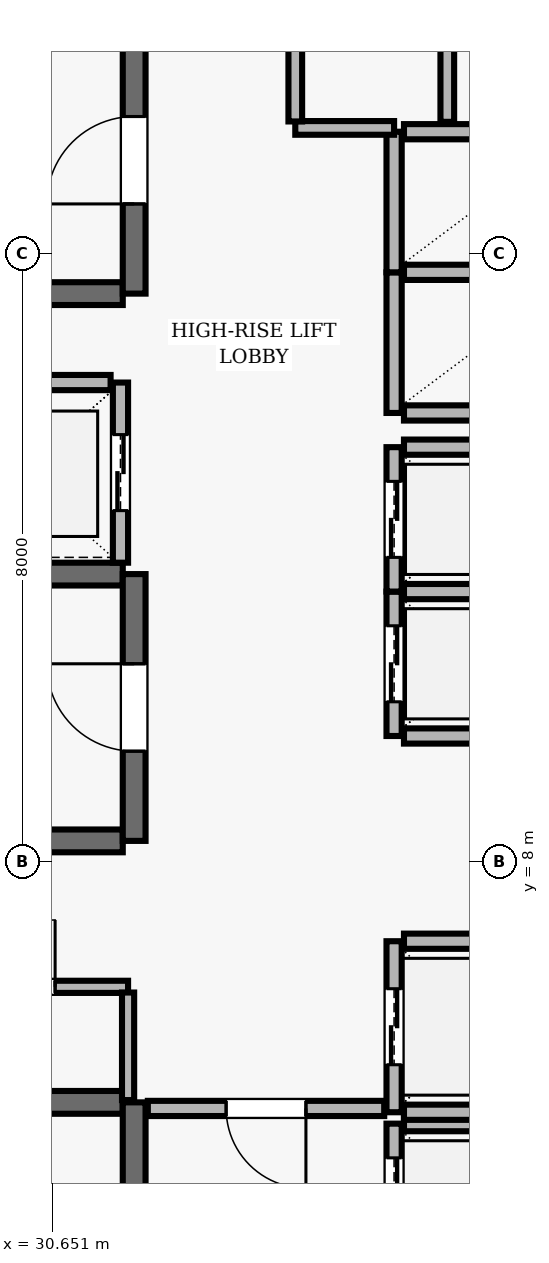
"""IFC4 building model, lengths in metres.
Left out: names, types, materials, properties, quantities, classifications, styles, units other than length and angle.
Written with IfcOpenShell. Run it as: python <this file> out.ifc"""

import sys

from ifc_helpers import new_model, si_unit, direction, frame, frame_2d, origin, place, context, subcontext, project, spatial, rectangle, extrude, element, fill, save


model = new_model("IFC4")
c1 = context("Model", 3, precision=1e-05, world=origin(), true_north=direction((0.0, 1.0)))
c2 = subcontext(c1, "Body", "Model", "MODEL_VIEW")
j1 = project(units=[si_unit("LENGTHUNIT", "METRE"), si_unit("PLANEANGLEUNIT", "RADIAN")], contexts=[c1])
p1 = place(None, origin())
s1 = spatial("IfcSite", under=j1, at=p1, CompositionType="ELEMENT")
p2 = place(p1, origin())
s2 = spatial("IfcBuilding", under=s1, at=p2, CompositionType="ELEMENT")
p3 = place(p2, frame((0.0, 0.0, 210.9)))
s3 = spatial("IfcBuildingStorey", under=s2, at=p3, CompositionType="ELEMENT", Elevation=210.9)
p4 = place(p3, frame((31.58, 4.83, 0.0), z_axis=(0.0, 0.0, 1.0), x_axis=(-1.0, 0.0, 0.0)))
e1 = element("IfcWall", 1, at=p4, inside=s3, PredefinedType="SHEAR", context=c2, shape_type="SweptSolid", body=[
    extrude(rectangle(XDim=8.36, YDim=0.3, at=frame_2d((4.18, 0.0))), origin(), (0.0, 0.0, 1.0), 3.69),
])
p5 = place(p3, frame((31.73, 0.96, 0.0), z_axis=(0.0, 0.0, 1.0), x_axis=(0.0, 1.0, 0.0)))
e2 = element("IfcWall", 2, at=p5, inside=s3, PredefinedType="SHEAR", context=c2, shape_type="SweptSolid", body=[
    extrude(rectangle(XDim=3.87, YDim=0.3, at=frame_2d((1.935, 0.0))), origin(), (0.0, 0.0, 1.0), 3.69),
])
p6 = place(p5, frame((1.54, 0.0, 0.0)))
e3 = element("IfcOpeningElement", 3, at=p6, cuts=e2, PredefinedType="OPENING", context=c2, shape_type="SweptSolid", body=[
    extrude(rectangle(XDim=1.15, YDim=2.15, at=frame_2d((0.575, 1.075))), frame((0.0, 0.16, 0.0), z_axis=(0.0, -1.0, 0.0), x_axis=(1.0, 0.0, 0.0)), (0.0, 0.0, 1.0), 0.32),
])
p7 = place(p3, frame((23.22, 15.47, 0.0), z_axis=(0.0, 0.0, 1.0), x_axis=(1.0, 0.0, 0.0)))
e4 = element("IfcWall", 4, at=p7, inside=s3, PredefinedType="SHEAR", context=c2, shape_type="SweptSolid", body=[
    extrude(rectangle(XDim=8.36, YDim=0.3, at=frame_2d((4.18, 0.0))), origin(), (0.0, 0.0, 1.0), 3.69),
])
p8 = place(p3, frame((31.73, 15.47, 0.0), z_axis=(0.0, 0.0, 1.0), x_axis=(0.0, 1.0, 0.0)))
e5 = element("IfcWall", 5, at=p8, inside=s3, PredefinedType="SHEAR", context=c2, shape_type="SweptSolid", body=[
    extrude(rectangle(XDim=3.51, YDim=0.3, at=frame_2d((1.755, 0.0))), origin(), (0.0, 0.0, 1.0), 3.69),
])
p9 = place(p8, frame((1.18, 0.0, 0.0)))
e6 = element("IfcOpeningElement", 6, at=p9, cuts=e5, PredefinedType="OPENING", context=c2, shape_type="SweptSolid", body=[
    extrude(rectangle(XDim=1.15, YDim=2.15, at=frame_2d((0.575, 1.075))), frame((0.0, 0.16, 0.0), z_axis=(0.0, -1.0, 0.0), x_axis=(1.0, 0.0, 0.0)), (0.0, 0.0, 1.0), 0.32),
])
for number, where, z_axis, x_axis in (
    (7, (31.58, 11.78, 0.0), (0.0, 0.0, 1.0), (-1.0, 0.0, 0.0)),
    (8, (23.22, 8.27, 0.0), (0.0, 0.0, 1.0), (1.0, 0.0, 0.0)),
):
    element("IfcWall", number, at=place(p3, frame(where, z_axis=z_axis, x_axis=x_axis)), inside=s3, PredefinedType="SHEAR", context=c2, shape_type="SweptSolid", body=[
        extrude(rectangle(XDim=8.36, YDim=0.3, at=frame_2d((4.18, 0.0))), origin(), (0.0, 0.0, 1.0), 3.69),
    ])
p10 = place(p3, frame((31.73, 8.27, 0.0), z_axis=(0.0, 0.0, 1.0), x_axis=(0.0, 1.0, 0.0)))
e9 = element("IfcWall", 9, at=p10, inside=s3, PredefinedType="SHEAR", context=c2, shape_type="SweptSolid", body=[
    extrude(rectangle(XDim=3.51, YDim=0.3, at=frame_2d((1.755, 0.0))), origin(), (0.0, 0.0, 1.0), 3.69),
])
p11 = place(p10, frame((1.18, 0.0, 0.0)))
e10 = element("IfcOpeningElement", 10, at=p11, cuts=e9, PredefinedType="OPENING", context=c2, shape_type="SweptSolid", body=[
    extrude(rectangle(XDim=1.15, YDim=2.15, at=frame_2d((0.575, 1.075))), frame((0.0, 0.16, 0.0), z_axis=(0.0, -1.0, 0.0), x_axis=(1.0, 0.0, 0.0)), (0.0, 0.0, 1.0), 0.32),
])
p12 = place(p3, frame((35.15, 4.55, 0.0), z_axis=(0.0, 0.0, 1.0), x_axis=(0.0, -1.0, 0.0)))
e11 = element("IfcWall", 11, at=p12, inside=s3, PredefinedType="SOLIDWALL", context=c2, shape_type="SweptSolid", body=[
    extrude(rectangle(XDim=2.1, YDim=0.2, at=frame_2d((1.05, 0.0))), origin(), (0.0, 0.0, 1.0), 3.69),
])
p13 = place(p12, frame((0.45, 0.0, 0.0)))
e12 = element("IfcOpeningElement", 12, at=p13, cuts=e11, PredefinedType="OPENING", context=c2, shape_type="SweptSolid", body=[
    extrude(rectangle(XDim=1.2, YDim=2.15, at=frame_2d((0.6, 1.075))), frame((0.0, 0.11, 0.0), z_axis=(0.0, -1.0, 0.0), x_axis=(1.0, 0.0, 0.0)), (0.0, 0.0, 1.0), 0.22),
])
p14 = place(p3, frame((37.42, 4.55, 0.0), z_axis=(0.0, 0.0, 1.0), x_axis=(-1.0, 0.0, 0.0)))
e13 = element("IfcWall", 13, at=p14, inside=s3, PredefinedType="SOLIDWALL", context=c2, shape_type="SweptSolid", body=[
    extrude(rectangle(XDim=2.14, YDim=0.2, at=frame_2d((1.07, 0.0))), origin(), (0.0, 0.0, 1.0), 3.69),
])
p15 = place(p3, frame((35.15, 6.95, 0.0), z_axis=(0.0, 0.0, 1.0), x_axis=(0.0, -1.0, 0.0)))
e14 = element("IfcWall", 14, at=p15, inside=s3, PredefinedType="SOLIDWALL", context=c2, shape_type="SweptSolid", body=[
    extrude(rectangle(XDim=2.25, YDim=0.2, at=frame_2d((1.125, 0.0))), origin(), (0.0, 0.0, 1.0), 3.69),
])
p16 = place(p15, frame((0.625, 0.0, 0.0)))
e15 = element("IfcOpeningElement", 15, at=p16, cuts=e14, PredefinedType="OPENING", context=c2, shape_type="SweptSolid", body=[
    extrude(rectangle(XDim=1.0, YDim=2.1, at=frame_2d((0.5, 1.05))), frame((0.0, 0.11, 0.0), z_axis=(0.0, -1.0, 0.0), x_axis=(1.0, 0.0, 0.0)), (0.0, 0.0, 1.0), 0.22),
])
for number, where, z_axis, x_axis in (
    (16, (35.28, 4.7, 0.0), (0.0, 0.0, 1.0), (1.0, 0.0, 0.0)),
    (17, (37.42, 6.95, 0.0), (0.0, 0.0, 1.0), (-1.0, 0.0, 0.0)),
):
    element("IfcWall", number, at=place(p3, frame(where, z_axis=z_axis, x_axis=x_axis)), inside=s3, PredefinedType="SOLIDWALL", context=c2, shape_type="SweptSolid", body=[
        extrude(rectangle(XDim=2.14, YDim=0.2, at=frame_2d((1.07, 0.0))), origin(), (0.0, 0.0, 1.0), 3.69),
    ])
p17 = place(p3, frame((35.15, 11.55, 0.0), z_axis=(0.0, 0.0, 1.0), x_axis=(0.0, -1.0, 0.0)))
e18 = element("IfcWall", 18, at=p17, inside=s3, PredefinedType="SOLIDWALL", context=c2, shape_type="SweptSolid", body=[
    extrude(rectangle(XDim=1.9, YDim=0.2, at=frame_2d((0.95, 0.0))), origin(), (0.0, 0.0, 1.0), 3.69),
])
p18 = place(p17, frame((0.45, 0.0, 0.0)))
e19 = element("IfcOpeningElement", 19, at=p18, cuts=e18, PredefinedType="OPENING", context=c2, shape_type="SweptSolid", body=[
    extrude(rectangle(XDim=1.0, YDim=2.1, at=frame_2d((0.5, 1.05))), frame((0.0, 0.11, 0.0), z_axis=(0.0, -1.0, 0.0), x_axis=(1.0, 0.0, 0.0)), (0.0, 0.0, 1.0), 0.22),
])
for number, where, z_axis, x_axis in (
    (20, (35.28, 9.65, 0.0), (0.0, 0.0, 1.0), (1.0, 0.0, 0.0)),
    (21, (37.42, 11.55, 0.0), (0.0, 0.0, 1.0), (-1.0, 0.0, 0.0)),
):
    element("IfcWall", number, at=place(p3, frame(where, z_axis=z_axis, x_axis=x_axis)), inside=s3, PredefinedType="SOLIDWALL", context=c2, shape_type="SweptSolid", body=[
        extrude(rectangle(XDim=2.14, YDim=0.2, at=frame_2d((1.07, 0.0))), origin(), (0.0, 0.0, 1.0), 3.69),
    ])
p19 = place(p3, frame((35.15, 13.45, 0.0), z_axis=(0.0, 0.0, 1.0), x_axis=(0.0, -1.0, 0.0)))
e22 = element("IfcWall", 22, at=p19, inside=s3, PredefinedType="SOLIDWALL", context=c2, shape_type="SweptSolid", body=[
    extrude(rectangle(XDim=1.9, YDim=0.2, at=frame_2d((0.95, 0.0))), origin(), (0.0, 0.0, 1.0), 3.69),
])
p20 = place(p19, frame((0.45, 0.0, 0.0)))
e23 = element("IfcOpeningElement", 23, at=p20, cuts=e22, PredefinedType="OPENING", context=c2, shape_type="SweptSolid", body=[
    extrude(rectangle(XDim=1.0, YDim=2.1, at=frame_2d((0.5, 1.05))), frame((0.0, 0.11, 0.0), z_axis=(0.0, -1.0, 0.0), x_axis=(1.0, 0.0, 0.0)), (0.0, 0.0, 1.0), 0.22),
])
p21 = place(p3, frame((37.42, 13.45, 0.0), z_axis=(0.0, 0.0, 1.0), x_axis=(-1.0, 0.0, 0.0)))
e24 = element("IfcWall", 24, at=p21, inside=s3, PredefinedType="SOLIDWALL", context=c2, shape_type="SweptSolid", body=[
    extrude(rectangle(XDim=2.14, YDim=0.2, at=frame_2d((1.07, 0.0))), origin(), (0.0, 0.0, 1.0), 3.69),
])
p22 = place(p3, frame((31.55, 11.93, 0.0), z_axis=(0.0, 0.0, 1.0), x_axis=(0.0, 1.0, 0.0)))
e25 = element("IfcWall", 25, at=p22, inside=s3, PredefinedType="SOLIDWALL", context=c2, shape_type="SweptSolid", body=[
    extrude(rectangle(XDim=2.37, YDim=0.2, at=frame_2d((1.185, 0.0))), origin(), (0.0, 0.0, 1.0), 3.69),
])
p23 = place(p22, frame((0.685, 0.0, 0.0)))
e26 = element("IfcOpeningElement", 26, at=p23, cuts=e25, PredefinedType="OPENING", context=c2, shape_type="SweptSolid", body=[
    extrude(rectangle(XDim=1.0, YDim=2.1, at=frame_2d((0.5, 1.05))), frame((0.0, 0.11, 0.0), z_axis=(0.0, -1.0, 0.0), x_axis=(1.0, 0.0, 0.0)), (0.0, 0.0, 1.0), 0.22),
])
p24 = place(p3, frame((31.42, 14.3, 0.0), z_axis=(0.0, 0.0, 1.0), x_axis=(-1.0, 0.0, 0.0)))
e27 = element("IfcWall", 27, at=p24, inside=s3, PredefinedType="SOLIDWALL", context=c2, shape_type="SweptSolid", body=[
    extrude(rectangle(XDim=2.44, YDim=0.2, at=frame_2d((1.22, 0.0))), origin(), (0.0, 0.0, 1.0), 3.69),
])
p25 = place(p3, frame((35.15, 15.75, 0.0), z_axis=(0.0, 0.0, 1.0), x_axis=(0.0, -1.0, 0.0)))
e28 = element("IfcWall", 28, at=p25, inside=s3, PredefinedType="SOLIDWALL", context=c2, shape_type="SweptSolid", body=[
    extrude(rectangle(XDim=1.85, YDim=0.2, at=frame_2d((0.925, 0.0))), origin(), (0.0, 0.0, 1.0), 3.69),
])
for number, where, z_axis, x_axis in (
    (29, (35.28, 13.9, 0.0), (0.0, 0.0, 1.0), (1.0, 0.0, 0.0)),
    (30, (37.42, 15.75, 0.0), (0.0, 0.0, 1.0), (-1.0, 0.0, 0.0)),
):
    element("IfcWall", number, at=place(p3, frame(where, z_axis=z_axis, x_axis=x_axis)), inside=s3, PredefinedType="SOLIDWALL", context=c2, shape_type="SweptSolid", body=[
        extrude(rectangle(XDim=2.14, YDim=0.2, at=frame_2d((1.07, 0.0))), origin(), (0.0, 0.0, 1.0), 3.69),
    ])
p26 = place(p3, frame((35.15, 17.6, 0.0), z_axis=(0.0, 0.0, 1.0), x_axis=(0.0, -1.0, 0.0)))
e31 = element("IfcWall", 31, at=p26, inside=s3, PredefinedType="SOLIDWALL", context=c2, shape_type="SweptSolid", body=[
    extrude(rectangle(XDim=1.85, YDim=0.2, at=frame_2d((0.925, 0.0))), origin(), (0.0, 0.0, 1.0), 3.69),
])
p27 = place(p3, frame((37.42, 17.6, 0.0), z_axis=(0.0, 0.0, 1.0), x_axis=(-1.0, 0.0, 0.0)))
e32 = element("IfcWall", 32, at=p27, inside=s3, PredefinedType="SOLIDWALL", context=c2, shape_type="SweptSolid", body=[
    extrude(rectangle(XDim=2.14, YDim=0.2, at=frame_2d((1.07, 0.0))), origin(), (0.0, 0.0, 1.0), 3.69),
])
p28 = place(p3, frame((28.85, 6.35, 0.0), z_axis=(0.0, 0.0, 1.0), x_axis=(1.0, 0.0, 0.0)))
e33 = element("IfcWall", 33, at=p28, inside=s3, PredefinedType="PARTITIONING", context=c2, shape_type="SweptSolid", body=[
    extrude(rectangle(XDim=2.8, YDim=0.16, at=frame_2d((1.4, 0.0))), origin(), (0.0, 0.0, 1.0), 3.69),
])
p29 = place(p28, frame((0.96, 0.0, 0.0)))
e34 = element("IfcOpeningElement", 34, at=p29, cuts=e33, PredefinedType="OPENING", context=c2, shape_type="SweptSolid", body=[
    extrude(rectangle(XDim=0.88, YDim=2.1, at=frame_2d((0.44, 1.05))), frame((0.0, 0.09, 0.0), z_axis=(0.0, -1.0, 0.0), x_axis=(1.0, 0.0, 0.0)), (0.0, 0.0, 1.0), 0.18),
])
p30 = place(p3, frame((33.85, 17.65, 0.0), z_axis=(0.0, 0.0, 1.0), x_axis=(1.0, 0.0, 0.0)))
e35 = element("IfcWall", 35, at=p30, inside=s3, PredefinedType="PARTITIONING", context=c2, shape_type="SweptSolid", body=[
    extrude(rectangle(XDim=1.3, YDim=0.18, at=frame_2d((0.65, 0.0))), origin(), (0.0, 0.0, 1.0), 3.69),
])
p31 = place(p3, frame((35.02, 4.75, 0.0), z_axis=(0.0, 0.0, 1.0), x_axis=(-1.0, 0.0, 0.0)))
e36 = element("IfcWall", 36, at=p31, inside=s3, PredefinedType="SOLIDWALL", context=c2, shape_type="SweptSolid", body=[
    extrude(rectangle(XDim=3.11, YDim=0.2, at=frame_2d((1.555, 0.0))), origin(), (0.0, 0.0, 1.0), 3.69),
])
p32 = place(p31, frame((1.03, 0.0, 0.0)))
e37 = element("IfcOpeningElement", 37, at=p32, cuts=e36, PredefinedType="OPENING", context=c2, shape_type="SweptSolid", body=[
    extrude(rectangle(XDim=1.05, YDim=2.15, at=frame_2d((0.525, 1.075))), frame((0.0, 0.11, 0.0), z_axis=(0.0, -1.0, 0.0), x_axis=(1.0, 0.0, 0.0)), (0.0, 0.0, 1.0), 0.22),
])
p33 = place(p3, frame((31.65, 4.86, 0.0), z_axis=(0.0, 0.0, 1.0), x_axis=(0.0, 1.0, 0.0)))
e38 = element("IfcWall", 38, at=p33, inside=s3, PredefinedType="PARTITIONING", context=c2, shape_type="SweptSolid", body=[
    extrude(rectangle(XDim=1.415, YDim=0.16, at=frame_2d((0.708, 0.0))), origin(), (0.0, 0.0, 1.0), 3.69),
])
p34 = place(p3, frame((33.85, 17.735, 0.0), z_axis=(0.0, 0.0, 1.0), x_axis=(0.0, 1.0, 0.0)))
e39 = element("IfcWall", 39, at=p34, inside=s3, PredefinedType="PARTITIONING", context=c2, shape_type="SweptSolid", body=[
    extrude(rectangle(XDim=6.03, YDim=0.18, at=frame_2d((3.015, 0.0))), origin(), (0.0, 0.0, 1.0), 3.69),
])
p35 = place(p34, frame((2.54, 0.0, 0.0)))
e40 = element("IfcOpeningElement", 40, at=p35, cuts=e39, PredefinedType="OPENING", context=c2, shape_type="SweptSolid", body=[
    extrude(rectangle(XDim=0.95, YDim=2.1, at=frame_2d((0.475, 1.05))), frame((0.0, 0.1, 0.0), z_axis=(0.0, -1.0, 0.0), x_axis=(1.0, 0.0, 0.0)), (0.0, 0.0, 1.0), 0.2),
])
p36 = place(p3, frame((35.85, 17.73, 0.0), z_axis=(0.0, 0.0, 1.0), x_axis=(0.0, 1.0, 0.0)))
e41 = element("IfcWall", 41, at=p36, inside=s3, PredefinedType="PARTITIONING", context=c2, shape_type="SweptSolid", body=[
    extrude(rectangle(XDim=3.412, YDim=0.18, at=frame_2d((1.706, 0.0))), origin(), (0.0, 0.0, 1.0), 3.69),
])
p37 = place(p36, frame((1.256, 0.0, 0.0)))
e42 = element("IfcOpeningElement", 42, at=p37, cuts=e41, PredefinedType="OPENING", context=c2, shape_type="SweptSolid", body=[
    extrude(rectangle(XDim=0.9, YDim=2.1, at=frame_2d((0.45, 1.05))), frame((0.0, 0.1, 0.0), z_axis=(0.0, -1.0, 0.0), x_axis=(1.0, 0.0, 0.0)), (0.0, 0.0, 1.0), 0.2),
])
p38 = place(p9, origin())
e43 = element("IfcDoor", 43, at=p38, inside=s3, OperationType="SINGLE_SWING_LEFT", PredefinedType="DOOR", context=c2, shape_type="SweptSolid", body=[
    extrude(rectangle(XDim=1.15, YDim=2.15, at=frame_2d((0.575, 1.075))), frame((0.0, 0.025, 0.0), z_axis=(0.0, -1.0, 0.0), x_axis=(1.0, 0.0, 0.0)), (0.0, 0.0, 1.0), 0.05),
])
fill(e6, e43)
p39 = place(p11, origin())
e44 = element("IfcDoor", 44, at=p39, inside=s3, OperationType="SINGLE_SWING_RIGHT", PredefinedType="DOOR", context=c2, shape_type="SweptSolid", body=[
    extrude(rectangle(XDim=1.15, YDim=2.15, at=frame_2d((0.575, 1.075))), frame((0.0, 0.025, 0.0), z_axis=(0.0, -1.0, 0.0), x_axis=(1.0, 0.0, 0.0)), (0.0, 0.0, 1.0), 0.05),
])
fill(e10, e44)
p40 = place(p13, origin())
e45 = element("IfcDoor", 45, at=p40, inside=s3, OperationType="DOUBLE_DOOR_SLIDING", PredefinedType="DOOR", context=c2, shape_type="SweptSolid", body=[
    extrude(rectangle(XDim=1.2, YDim=2.15, at=frame_2d((0.6, 1.075))), frame((0.0, 0.025, 0.0), z_axis=(0.0, -1.0, 0.0), x_axis=(1.0, 0.0, 0.0)), (0.0, 0.0, 1.0), 0.05),
])
fill(e12, e45)
p41 = place(p16, origin())
e46 = element("IfcDoor", 46, at=p41, inside=s3, OperationType="DOUBLE_DOOR_SLIDING", PredefinedType="DOOR", context=c2, shape_type="SweptSolid", body=[
    extrude(rectangle(XDim=1.0, YDim=2.1, at=frame_2d((0.5, 1.05))), frame((0.0, 0.025, 0.0), z_axis=(0.0, -1.0, 0.0), x_axis=(1.0, 0.0, 0.0)), (0.0, 0.0, 1.0), 0.05),
])
fill(e15, e46)
p42 = place(p18, origin())
e47 = element("IfcDoor", 47, at=p42, inside=s3, OperationType="DOUBLE_DOOR_SLIDING", PredefinedType="DOOR", context=c2, shape_type="SweptSolid", body=[
    extrude(rectangle(XDim=1.0, YDim=2.1, at=frame_2d((0.5, 1.05))), frame((0.0, 0.025, 0.0), z_axis=(0.0, -1.0, 0.0), x_axis=(1.0, 0.0, 0.0)), (0.0, 0.0, 1.0), 0.05),
])
fill(e19, e47)
p43 = place(p20, origin())
e48 = element("IfcDoor", 48, at=p43, inside=s3, OperationType="DOUBLE_DOOR_SLIDING", PredefinedType="DOOR", context=c2, shape_type="SweptSolid", body=[
    extrude(rectangle(XDim=1.0, YDim=2.1, at=frame_2d((0.5, 1.05))), frame((0.0, 0.025, 0.0), z_axis=(0.0, -1.0, 0.0), x_axis=(1.0, 0.0, 0.0)), (0.0, 0.0, 1.0), 0.05),
])
fill(e23, e48)
p44 = place(p23, origin())
e49 = element("IfcDoor", 49, at=p44, inside=s3, OperationType="DOUBLE_DOOR_SLIDING", PredefinedType="DOOR", context=c2, shape_type="SweptSolid", body=[
    extrude(rectangle(XDim=1.0, YDim=2.1, at=frame_2d((0.5, 1.05))), frame((0.0, 0.025, 0.0), z_axis=(0.0, -1.0, 0.0), x_axis=(1.0, 0.0, 0.0)), (0.0, 0.0, 1.0), 0.05),
])
fill(e26, e49)
p45 = place(p32, origin())
e50 = element("IfcDoor", 50, at=p45, inside=s3, OperationType="SINGLE_SWING_LEFT", PredefinedType="DOOR", context=c2, shape_type="SweptSolid", body=[
    extrude(rectangle(XDim=1.05, YDim=2.15, at=frame_2d((0.525, 1.075))), frame((0.0, 0.025, 0.0), z_axis=(0.0, -1.0, 0.0), x_axis=(1.0, 0.0, 0.0)), (0.0, 0.0, 1.0), 0.05),
])
fill(e37, e50)
p46 = place(p29, origin())
e51 = element("IfcDoor", 51, at=p46, inside=s3, OperationType="SINGLE_SWING_RIGHT", PredefinedType="DOOR", context=c2, shape_type="SweptSolid", body=[
    extrude(rectangle(XDim=0.88, YDim=2.1, at=frame_2d((0.44, 1.05))), frame((0.0, 0.025, 0.0), z_axis=(0.0, -1.0, 0.0), x_axis=(1.0, 0.0, 0.0)), (0.0, 0.0, 1.0), 0.05),
])
fill(e34, e51)
save(model, sys.argv[1])
